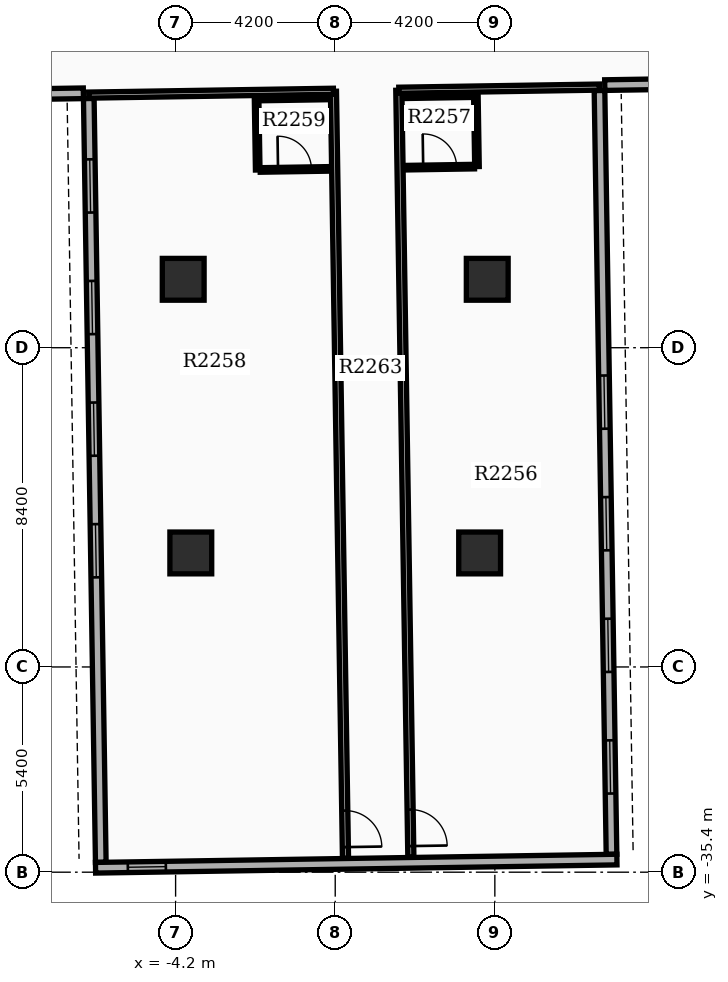
"""IFC4 building model, lengths in metres.
Left out: names, types, materials, properties, quantities, classifications, styles, units other than length and angle.
Written with IfcOpenShell. Run it as: python <this file> out.ifc"""

import sys

from ifc_helpers import new_model, si_unit, direction, frame, frame_2d, origin, origin_2d, place, context, subcontext, project, spatial, rectangle, extrude, element, fill, save


model = new_model("IFC4")
c1 = context("Model", 3, precision=1e-05, world=origin(), true_north=direction((0.0, 1.0)))
c2 = subcontext(c1, "Body", "Model", "MODEL_VIEW")
j1 = project(units=[si_unit("LENGTHUNIT", "METRE"), si_unit("PLANEANGLEUNIT", "RADIAN")], contexts=[c1])
p1 = place(None, origin())
s1 = spatial("IfcSite", under=j1, at=p1, CompositionType="ELEMENT")
p2 = place(p1, origin())
s2 = spatial("IfcBuilding", under=s1, at=p2, CompositionType="ELEMENT")
p3 = place(p2, frame((0.0, 0.0, 139.8)))
s3 = spatial("IfcBuildingStorey", under=s2, at=p3, CompositionType="ELEMENT", Elevation=139.8)
for number, where, z_axis, x_axis in (
    (1, (-4.0, -19.8, 0.0), (0.0, 0.0, 1.0), (1.0, 0.0, 0.0)),
    (2, (4.0, -19.8, 0.0), (0.0, 0.0, 1.0), (1.0, 0.0, 0.0)),
    (3, (-3.8, -27.0, 0.0), (0.0, 0.0, 1.0), (1.0, 0.0, 0.0)),
    (4, (3.8, -27.0, 0.0), (0.0, 0.0, 1.0), (1.0, 0.0, 0.0)),
):
    element("IfcColumn", number, at=place(p3, frame(where, z_axis=z_axis, x_axis=x_axis)), inside=s3, PredefinedType="COLUMN", context=c2, shape_type="SweptSolid", body=[
        extrude(rectangle(XDim=1.1, YDim=1.1, at=origin_2d()), origin(), (0.0, 0.0, 1.0), 3.9),
    ])
p4 = place(p3, frame((-6.485, -15.044, 0.0), z_axis=(0.0, 0.0, 1.0), x_axis=(0.01571739401, -0.999876474133, 0.0)))
e5 = element("IfcWall", 5, at=p4, inside=s3, PredefinedType="STANDARD", context=c2, shape_type="SweptSolid", body=[
    extrude(rectangle(XDim=20.1, YDim=0.28, at=frame_2d((10.05, 0.0))), origin(), (0.0, 0.0, 1.0), 2.92),
])
p5 = place(p4, frame((1.6, 0.0, 0.8)))
e6 = element("IfcOpeningElement", 6, at=p5, cuts=e5, PredefinedType="OPENING", context=c2, shape_type="SweptSolid", body=[
    extrude(rectangle(XDim=1.4, YDim=1.6, at=frame_2d((0.7, 0.8))), frame((0.0, 0.15, 0.0), z_axis=(0.0, -1.0, 0.0), x_axis=(1.0, 0.0, 0.0)), (0.0, 0.0, 1.0), 0.3),
])
p6 = place(p4, frame((4.8, 0.0, 0.8)))
e7 = element("IfcOpeningElement", 7, at=p6, cuts=e5, PredefinedType="OPENING", context=c2, shape_type="SweptSolid", body=[
    extrude(rectangle(XDim=1.4, YDim=1.6, at=frame_2d((0.7, 0.8))), frame((0.0, 0.15, 0.0), z_axis=(0.0, -1.0, 0.0), x_axis=(1.0, 0.0, 0.0)), (0.0, 0.0, 1.0), 0.3),
])
p7 = place(p4, frame((8.0, 0.0, 0.8)))
e8 = element("IfcOpeningElement", 8, at=p7, cuts=e5, PredefinedType="OPENING", context=c2, shape_type="SweptSolid", body=[
    extrude(rectangle(XDim=1.4, YDim=1.6, at=frame_2d((0.7, 0.8))), frame((0.0, 0.15, 0.0), z_axis=(0.0, -1.0, 0.0), x_axis=(1.0, 0.0, 0.0)), (0.0, 0.0, 1.0), 0.3),
])
p8 = place(p4, frame((11.2, 0.0, 0.8)))
e9 = element("IfcOpeningElement", 9, at=p8, cuts=e5, PredefinedType="OPENING", context=c2, shape_type="SweptSolid", body=[
    extrude(rectangle(XDim=1.4, YDim=1.6, at=frame_2d((0.7, 0.8))), frame((0.0, 0.15, 0.0), z_axis=(0.0, -1.0, 0.0), x_axis=(1.0, 0.0, 0.0)), (0.0, 0.0, 1.0), 0.3),
])
p9 = place(p3, frame((7.27, -34.93, 0.0), z_axis=(0.0, 0.0, 1.0), x_axis=(-0.015705059908, 0.999876667941, 0.0)))
e10 = element("IfcWall", 10, at=p9, inside=s3, PredefinedType="STANDARD", context=c2, shape_type="SweptSolid", body=[
    extrude(rectangle(XDim=20.1, YDim=0.28, at=frame_2d((10.05, 0.0))), origin(), (0.0, 0.0, 1.0), 2.92),
])
p10 = place(p9, frame((1.6, 0.0, 0.8)))
e11 = element("IfcOpeningElement", 11, at=p10, cuts=e10, PredefinedType="OPENING", context=c2, shape_type="SweptSolid", body=[
    extrude(rectangle(XDim=1.4, YDim=1.6, at=frame_2d((0.7, 0.8))), frame((0.0, 0.15, 0.0), z_axis=(0.0, -1.0, 0.0), x_axis=(1.0, 0.0, 0.0)), (0.0, 0.0, 1.0), 0.3),
])
p11 = place(p9, frame((4.8, 0.0, 0.8)))
e12 = element("IfcOpeningElement", 12, at=p11, cuts=e10, PredefinedType="OPENING", context=c2, shape_type="SweptSolid", body=[
    extrude(rectangle(XDim=1.4, YDim=1.6, at=frame_2d((0.7, 0.8))), frame((0.0, 0.15, 0.0), z_axis=(0.0, -1.0, 0.0), x_axis=(1.0, 0.0, 0.0)), (0.0, 0.0, 1.0), 0.3),
])
p12 = place(p9, frame((8.0, 0.0, 0.8)))
e13 = element("IfcOpeningElement", 13, at=p12, cuts=e10, PredefinedType="OPENING", context=c2, shape_type="SweptSolid", body=[
    extrude(rectangle(XDim=1.4, YDim=1.6, at=frame_2d((0.7, 0.8))), frame((0.0, 0.15, 0.0), z_axis=(0.0, -1.0, 0.0), x_axis=(1.0, 0.0, 0.0)), (0.0, 0.0, 1.0), 0.3),
])
p13 = place(p9, frame((11.2, 0.0, 0.8)))
e14 = element("IfcOpeningElement", 14, at=p13, cuts=e10, PredefinedType="OPENING", context=c2, shape_type="SweptSolid", body=[
    extrude(rectangle(XDim=1.4, YDim=1.6, at=frame_2d((0.7, 0.8))), frame((0.0, 0.15, 0.0), z_axis=(0.0, -1.0, 0.0), x_axis=(1.0, 0.0, 0.0)), (0.0, 0.0, 1.0), 0.3),
])
p14 = place(p3, frame((-6.307, -35.283, 0.0), z_axis=(0.0, 0.0, 1.0), x_axis=(0.999876549481, 0.015712599986, 0.0)))
e15 = element("IfcWall", 15, at=p14, inside=s3, PredefinedType="STANDARD", context=c2, shape_type="SweptSolid", body=[
    extrude(rectangle(XDim=13.72, YDim=0.28, at=frame_2d((6.86, 0.0))), origin(), (0.0, 0.0, 1.0), 2.92),
])
p15 = place(p14, frame((0.85, 0.0, 0.85)))
e16 = element("IfcOpeningElement", 16, at=p15, cuts=e15, PredefinedType="OPENING", context=c2, shape_type="SweptSolid", body=[
    extrude(rectangle(XDim=1.0, YDim=1.5, at=frame_2d((0.5, 0.75))), frame((0.0, 0.15, 0.0), z_axis=(0.0, -1.0, 0.0), x_axis=(1.0, 0.0, 0.0)), (0.0, 0.0, 1.0), 0.3),
])
p16 = place(p3, frame((-12.926, -15.005, 0.0), z_axis=(0.0, 0.0, 1.0), x_axis=(0.999876823822, 0.015695132501, 0.0)))
e17 = element("IfcWall", 17, at=p16, inside=s3, PredefinedType="STANDARD", context=c2, shape_type="SweptSolid", body=[
    extrude(rectangle(XDim=6.3, YDim=0.28, at=frame_2d((3.15, 0.0))), origin(), (0.0, 0.0, 1.0), 2.92),
])
p17 = place(p3, frame((13.391, -14.592, 0.0), z_axis=(0.0, 0.0, 1.0), x_axis=(-0.999876833368, -0.015694524359, 0.0)))
e18 = element("IfcWall", 18, at=p17, inside=s3, PredefinedType="STANDARD", context=c2, shape_type="SweptSolid", body=[
    extrude(rectangle(XDim=6.3, YDim=0.28, at=frame_2d((3.15, 0.0))), origin(), (0.0, 0.0, 1.0), 2.92),
])
p18 = place(p3, frame((1.673, -14.825, 0.0), z_axis=(0.0, 0.0, 1.0), x_axis=(0.015701893165, -0.999876717676, 0.0)))
e19 = element("IfcWall", 19, at=p18, inside=s3, PredefinedType="PARTITIONING", context=c2, shape_type="SweptSolid", body=[
    extrude(rectangle(XDim=20.182, YDim=0.16, at=frame_2d((10.091, 0.0))), origin(), (0.0, 0.0, 1.0), 2.91),
])
p19 = place(p18, frame((18.93, 0.0, 0.0)))
e20 = element("IfcOpeningElement", 20, at=p19, cuts=e19, PredefinedType="OPENING", context=c2, shape_type="SweptSolid", body=[
    extrude(rectangle(XDim=0.96, YDim=2.15, at=frame_2d((0.48, 1.075))), frame((0.0, 0.09, 0.0), z_axis=(0.0, -1.0, 0.0), x_axis=(1.0, 0.0, 0.0)), (0.0, 0.0, 1.0), 0.18),
])
p20 = place(p3, frame((1.673, -14.825, 0.0), z_axis=(0.0, 0.0, 1.0), x_axis=(0.999877138082, 0.015675099418, 0.0)))
e21 = element("IfcWall", 21, at=p20, inside=s3, PredefinedType="PARTITIONING", context=c2, shape_type="SweptSolid", body=[
    extrude(rectangle(XDim=5.28, YDim=0.16, at=frame_2d((2.64, 0.0))), origin(), (0.0, 0.0, 1.0), 2.91),
])
p21 = place(p3, frame((1.845, -16.863, 0.0), z_axis=(0.0, 0.0, 1.0), x_axis=(0.999876803258, 0.015696442504, 0.0)))
e22 = element("IfcWall", 22, at=p21, inside=s3, PredefinedType="PARTITIONING", context=c2, shape_type="SweptSolid", body=[
    extrude(rectangle(XDim=1.82, YDim=0.12, at=frame_2d((0.91, 0.0))), origin(), (0.0, 0.0, 1.0), 2.91),
])
p22 = place(p21, frame((0.47, 0.0, 0.0)))
e23 = element("IfcOpeningElement", 23, at=p22, cuts=e22, PredefinedType="OPENING", context=c2, shape_type="SweptSolid", body=[
    extrude(rectangle(XDim=0.88, YDim=2.1, at=frame_2d((0.44, 1.05))), frame((0.0, 0.07, 0.0), z_axis=(0.0, -1.0, 0.0), x_axis=(1.0, 0.0, 0.0)), (0.0, 0.0, 1.0), 0.14),
])
p23 = place(p3, frame((1.816, -14.983, 0.0), z_axis=(0.0, 0.0, 1.0), x_axis=(0.999874688728, 0.015830566654, 0.0)))
e24 = element("IfcWall", 24, at=p23, inside=s3, PredefinedType="PARTITIONING", context=c2, shape_type="SweptSolid", body=[
    extrude(rectangle(XDim=1.82, YDim=0.12, at=frame_2d((0.91, 0.0))), origin(), (0.0, 0.0, 1.0), 2.91),
])
p24 = place(p3, frame((3.7, -14.954, 0.0), z_axis=(0.0, 0.0, 1.0), x_axis=(0.015842167482, -0.99987450499, 0.0)))
e25 = element("IfcWall", 25, at=p24, inside=s3, PredefinedType="PARTITIONING", context=c2, shape_type="SweptSolid", body=[
    extrude(rectangle(XDim=1.88, YDim=0.12, at=frame_2d((0.94, 0.0))), origin(), (0.0, 0.0, 1.0), 2.91),
])
p25 = place(p3, frame((-0.047, -14.853, 0.0), z_axis=(0.0, 0.0, 1.0), x_axis=(0.015701893165, -0.999876717676, 0.0)))
e26 = element("IfcWall", 26, at=p25, inside=s3, PredefinedType="PARTITIONING", context=c2, shape_type="SweptSolid", body=[
    extrude(rectangle(XDim=20.182, YDim=0.16, at=frame_2d((10.091, 0.0))), origin(), (0.0, 0.0, 1.0), 2.91),
])
p26 = place(p25, frame((18.93, 0.0, 0.0)))
e27 = element("IfcOpeningElement", 27, at=p26, cuts=e26, PredefinedType="OPENING", context=c2, shape_type="SweptSolid", body=[
    extrude(rectangle(XDim=0.96, YDim=2.15, at=frame_2d((0.48, 1.075))), frame((0.0, 0.09, 0.0), z_axis=(0.0, -1.0, 0.0), x_axis=(1.0, 0.0, 0.0)), (0.0, 0.0, 1.0), 0.18),
])
p27 = place(p3, frame((-0.047, -14.853, 0.0), z_axis=(0.0, 0.0, 1.0), x_axis=(-0.99987682984, -0.015694749102, 0.0)))
e28 = element("IfcWall", 28, at=p27, inside=s3, PredefinedType="PARTITIONING", context=c2, shape_type="SweptSolid", body=[
    extrude(rectangle(XDim=6.44, YDim=0.16, at=frame_2d((3.22, 0.0))), origin(), (0.0, 0.0, 1.0), 2.91),
])
p28 = place(p3, frame((-1.974, -16.923, 0.0), z_axis=(0.0, 0.0, 1.0), x_axis=(0.999876803258, 0.015696442504, 0.0)))
e29 = element("IfcWall", 29, at=p28, inside=s3, PredefinedType="PARTITIONING", context=c2, shape_type="SweptSolid", body=[
    extrude(rectangle(XDim=1.82, YDim=0.12, at=frame_2d((0.91, 0.0))), origin(), (0.0, 0.0, 1.0), 2.91),
])
p29 = place(p28, frame((0.47, 0.0, 0.0)))
e30 = element("IfcOpeningElement", 30, at=p29, cuts=e29, PredefinedType="OPENING", context=c2, shape_type="SweptSolid", body=[
    extrude(rectangle(XDim=0.88, YDim=2.1, at=frame_2d((0.44, 1.05))), frame((0.0, 0.07, 0.0), z_axis=(0.0, -1.0, 0.0), x_axis=(1.0, 0.0, 0.0)), (0.0, 0.0, 1.0), 0.14),
])
p30 = place(p3, frame((-2.004, -15.043, 0.0), z_axis=(0.0, 0.0, 1.0), x_axis=(0.999876836305, 0.015694337248, 0.0)))
e31 = element("IfcWall", 31, at=p30, inside=s3, PredefinedType="PARTITIONING", context=c2, shape_type="SweptSolid", body=[
    extrude(rectangle(XDim=1.82, YDim=0.12, at=frame_2d((0.91, 0.0))), origin(), (0.0, 0.0, 1.0), 2.91),
])
p31 = place(p3, frame((-2.069, -15.044, 0.0), z_axis=(0.0, 0.0, 1.0), x_axis=(0.015714386166, -0.99987652141, 0.0)))
e32 = element("IfcWall", 32, at=p31, inside=s3, PredefinedType="PARTITIONING", context=c2, shape_type="SweptSolid", body=[
    extrude(rectangle(XDim=1.88, YDim=0.12, at=frame_2d((0.94, 0.0))), origin(), (0.0, 0.0, 1.0), 2.91),
])
p32 = place(p5, origin())
e33 = element("IfcWindow", 33, at=p32, inside=s3, PartitioningType="SINGLE_PANEL", PredefinedType="WINDOW", context=c2, shape_type="SweptSolid", body=[
    extrude(rectangle(XDim=1.4, YDim=1.6, at=frame_2d((0.7, 0.8))), frame((0.0, 0.03, 0.0), z_axis=(0.0, -1.0, 0.0), x_axis=(1.0, 0.0, 0.0)), (0.0, 0.0, 1.0), 0.06),
])
fill(e6, e33)
p33 = place(p6, origin())
e34 = element("IfcWindow", 34, at=p33, inside=s3, PartitioningType="SINGLE_PANEL", PredefinedType="WINDOW", context=c2, shape_type="SweptSolid", body=[
    extrude(rectangle(XDim=1.4, YDim=1.6, at=frame_2d((0.7, 0.8))), frame((0.0, 0.03, 0.0), z_axis=(0.0, -1.0, 0.0), x_axis=(1.0, 0.0, 0.0)), (0.0, 0.0, 1.0), 0.06),
])
fill(e7, e34)
p34 = place(p7, origin())
e35 = element("IfcWindow", 35, at=p34, inside=s3, PartitioningType="SINGLE_PANEL", PredefinedType="WINDOW", context=c2, shape_type="SweptSolid", body=[
    extrude(rectangle(XDim=1.4, YDim=1.6, at=frame_2d((0.7, 0.8))), frame((0.0, 0.03, 0.0), z_axis=(0.0, -1.0, 0.0), x_axis=(1.0, 0.0, 0.0)), (0.0, 0.0, 1.0), 0.06),
])
fill(e8, e35)
p35 = place(p8, origin())
e36 = element("IfcWindow", 36, at=p35, inside=s3, PartitioningType="SINGLE_PANEL", PredefinedType="WINDOW", context=c2, shape_type="SweptSolid", body=[
    extrude(rectangle(XDim=1.4, YDim=1.6, at=frame_2d((0.7, 0.8))), frame((0.0, 0.03, 0.0), z_axis=(0.0, -1.0, 0.0), x_axis=(1.0, 0.0, 0.0)), (0.0, 0.0, 1.0), 0.06),
])
fill(e9, e36)
p36 = place(p10, origin())
e37 = element("IfcWindow", 37, at=p36, inside=s3, PartitioningType="SINGLE_PANEL", PredefinedType="WINDOW", context=c2, shape_type="SweptSolid", body=[
    extrude(rectangle(XDim=1.4, YDim=1.6, at=frame_2d((0.7, 0.8))), frame((0.0, 0.03, 0.0), z_axis=(0.0, -1.0, 0.0), x_axis=(1.0, 0.0, 0.0)), (0.0, 0.0, 1.0), 0.06),
])
fill(e11, e37)
p37 = place(p11, origin())
e38 = element("IfcWindow", 38, at=p37, inside=s3, PartitioningType="SINGLE_PANEL", PredefinedType="WINDOW", context=c2, shape_type="SweptSolid", body=[
    extrude(rectangle(XDim=1.4, YDim=1.6, at=frame_2d((0.7, 0.8))), frame((0.0, 0.03, 0.0), z_axis=(0.0, -1.0, 0.0), x_axis=(1.0, 0.0, 0.0)), (0.0, 0.0, 1.0), 0.06),
])
fill(e12, e38)
p38 = place(p12, origin())
e39 = element("IfcWindow", 39, at=p38, inside=s3, PartitioningType="SINGLE_PANEL", PredefinedType="WINDOW", context=c2, shape_type="SweptSolid", body=[
    extrude(rectangle(XDim=1.4, YDim=1.6, at=frame_2d((0.7, 0.8))), frame((0.0, 0.03, 0.0), z_axis=(0.0, -1.0, 0.0), x_axis=(1.0, 0.0, 0.0)), (0.0, 0.0, 1.0), 0.06),
])
fill(e13, e39)
p39 = place(p13, origin())
e40 = element("IfcWindow", 40, at=p39, inside=s3, PartitioningType="SINGLE_PANEL", PredefinedType="WINDOW", context=c2, shape_type="SweptSolid", body=[
    extrude(rectangle(XDim=1.4, YDim=1.6, at=frame_2d((0.7, 0.8))), frame((0.0, 0.03, 0.0), z_axis=(0.0, -1.0, 0.0), x_axis=(1.0, 0.0, 0.0)), (0.0, 0.0, 1.0), 0.06),
])
fill(e14, e40)
p40 = place(p15, origin())
e41 = element("IfcWindow", 41, at=p40, inside=s3, PartitioningType="SINGLE_PANEL", PredefinedType="WINDOW", context=c2, shape_type="SweptSolid", body=[
    extrude(rectangle(XDim=1.0, YDim=1.5, at=frame_2d((0.5, 0.75))), frame((0.0, 0.03, 0.0), z_axis=(0.0, -1.0, 0.0), x_axis=(1.0, 0.0, 0.0)), (0.0, 0.0, 1.0), 0.06),
])
fill(e16, e41)
p41 = place(p19, origin())
e42 = element("IfcDoor", 42, at=p41, inside=s3, OperationType="SINGLE_SWING_RIGHT", PredefinedType="DOOR", context=c2, shape_type="SweptSolid", body=[
    extrude(rectangle(XDim=0.96, YDim=2.15, at=frame_2d((0.48, 1.075))), frame((0.0, 0.025, 0.0), z_axis=(0.0, -1.0, 0.0), x_axis=(1.0, 0.0, 0.0)), (0.0, 0.0, 1.0), 0.05),
])
fill(e20, e42)
p42 = place(p22, origin())
e43 = element("IfcDoor", 43, at=p42, inside=s3, OperationType="SINGLE_SWING_LEFT", PredefinedType="DOOR", context=c2, shape_type="SweptSolid", body=[
    extrude(rectangle(XDim=0.88, YDim=2.1, at=frame_2d((0.44, 1.05))), frame((0.0, 0.025, 0.0), z_axis=(0.0, -1.0, 0.0), x_axis=(1.0, 0.0, 0.0)), (0.0, 0.0, 1.0), 0.05),
])
fill(e23, e43)
p43 = place(p26, origin())
e44 = element("IfcDoor", 44, at=p43, inside=s3, OperationType="SINGLE_SWING_RIGHT", PredefinedType="DOOR", context=c2, shape_type="SweptSolid", body=[
    extrude(rectangle(XDim=0.96, YDim=2.15, at=frame_2d((0.48, 1.075))), frame((0.0, 0.025, 0.0), z_axis=(0.0, -1.0, 0.0), x_axis=(1.0, 0.0, 0.0)), (0.0, 0.0, 1.0), 0.05),
])
fill(e27, e44)
p44 = place(p29, origin())
e45 = element("IfcDoor", 45, at=p44, inside=s3, OperationType="SINGLE_SWING_LEFT", PredefinedType="DOOR", context=c2, shape_type="SweptSolid", body=[
    extrude(rectangle(XDim=0.88, YDim=2.1, at=frame_2d((0.44, 1.05))), frame((0.0, 0.025, 0.0), z_axis=(0.0, -1.0, 0.0), x_axis=(1.0, 0.0, 0.0)), (0.0, 0.0, 1.0), 0.05),
])
fill(e30, e45)
save(model, sys.argv[1])
